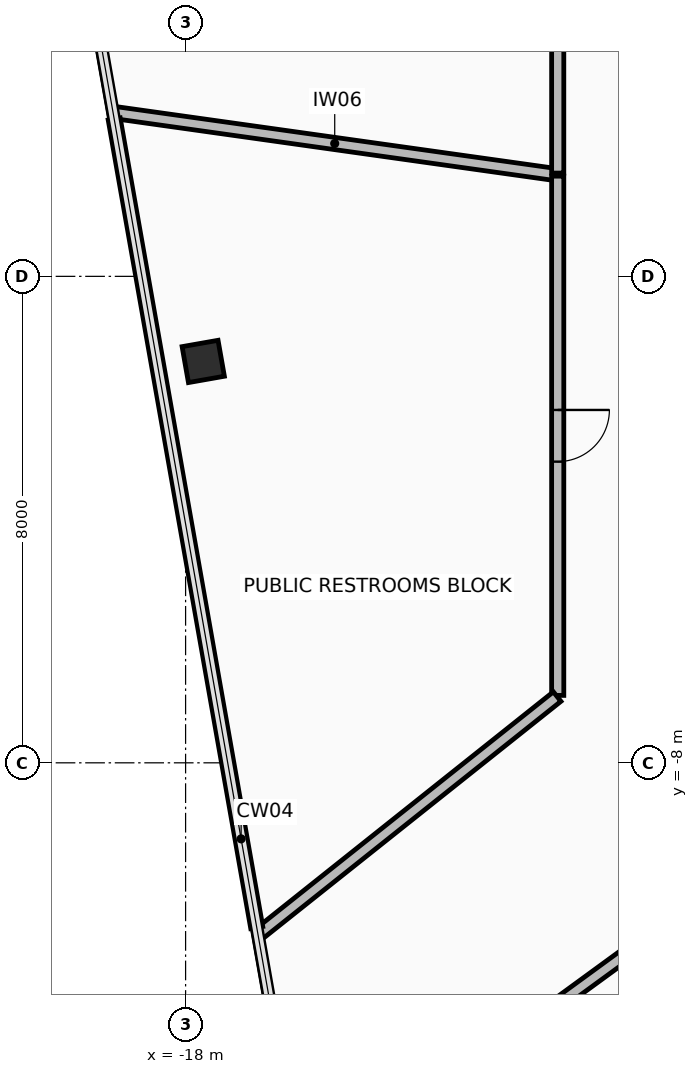
"""IFC4 building model, lengths in metres.
Left out: names, types, materials, properties, quantities, classifications, styles, units other than length and angle.
Written with IfcOpenShell. Run it as: python <this file> out.ifc"""

import sys

from ifc_helpers import new_model, si_unit, direction, frame, frame_2d, origin, origin_2d, place, context, subcontext, project, spatial, rectangle, hollow_rectangle, extrude, element, fill, save


model = new_model("IFC4")
c1 = context("Model", 3, precision=1e-05, world=origin(), true_north=direction((0.0, 1.0)))
c2 = subcontext(c1, "Body", "Model", "MODEL_VIEW")
j1 = project(units=[si_unit("LENGTHUNIT", "METRE"), si_unit("PLANEANGLEUNIT", "RADIAN")], contexts=[c1])
p1 = place(None, origin())
s1 = spatial("IfcSite", under=j1, at=p1, CompositionType="ELEMENT")
p2 = place(p1, origin())
s2 = spatial("IfcBuilding", under=s1, at=p2, CompositionType="ELEMENT")
p3 = place(p2, frame((0.0, 0.0, 181.3)))
s3 = spatial("IfcBuildingStorey", under=s2, at=p3, CompositionType="ELEMENT", Elevation=181.3)
p4 = place(p3, frame((-17.71, -1.399, 0.0), z_axis=(0.0, 0.0, 1.0), x_axis=(-0.173648177667, 0.984807753012, 0.0)))
e1 = element("IfcColumn", 1, at=p4, inside=s3, PredefinedType="COLUMN", context=c2, shape_type="SweptSolid", body=[
    extrude(hollow_rectangle(XDim=0.6, YDim=0.6, WallThickness=0.036, at=origin_2d()), origin(), (0.0, 0.0, 1.0), 3.6),
])
p5 = place(p3, frame((-19.194, 2.698, 0.0), z_axis=(0.0, 0.0, 1.0), x_axis=(0.990266577483, -0.139183711406, 0.0)))
e2 = element("IfcWall", 2, at=p5, inside=s3, PredefinedType="PARTITIONING", context=c2, shape_type="SweptSolid", body=[
    extrude(rectangle(XDim=7.364, YDim=0.2, at=frame_2d((3.682, 0.0))), origin(), (0.0, 0.0, 1.0), 2.715),
])
p6 = place(p3, frame((-11.88, 1.648, 0.0), z_axis=(0.0, 0.0, 1.0), x_axis=(0.0, -1.0, 0.0)))
e3 = element("IfcWall", 3, at=p6, inside=s3, PredefinedType="PARTITIONING", context=c2, shape_type="SweptSolid", body=[
    extrude(rectangle(XDim=8.539, YDim=0.2, at=frame_2d((4.27, 0.0))), origin(), (0.0, 0.0, 1.0), 2.865),
])
p7 = place(p6, frame((3.845, 0.0, 0.0)))
e4 = element("IfcOpeningElement", 4, at=p7, cuts=e3, PredefinedType="OPENING", context=c2, shape_type="SweptSolid", body=[
    extrude(rectangle(XDim=0.85, YDim=2.1, at=frame_2d((0.425, 1.05))), frame((0.0, 0.11, 0.0), z_axis=(0.0, -1.0, 0.0), x_axis=(1.0, 0.0, 0.0)), (0.0, 0.0, 1.0), 0.22),
])
p8 = place(p3, frame((-11.889, -6.911, 0.0), z_axis=(0.0, 0.0, 1.0), x_axis=(-0.782381746657, -0.622799167066, 0.0)))
e5 = element("IfcWall", 5, at=p8, inside=s3, PredefinedType="PARTITIONING", context=c2, shape_type="SweptSolid", body=[
    extrude(rectangle(XDim=6.288, YDim=0.2, at=frame_2d((3.144, 0.0))), origin(), (0.0, 0.0, 1.0), 2.715),
])
p9 = place(p3, frame((-16.83, -10.709, 0.0), z_axis=(0.0, 0.0, 1.0), x_axis=(-0.173641964803, 0.984808848487, 0.0)))
e6 = element("IfcWall", 6, at=p9, inside=s3, PredefinedType="PARTITIONING", context=c2, shape_type="SweptSolid", body=[
    extrude(rectangle(XDim=13.503, YDim=0.2, at=frame_2d((6.751, 0.0))), origin(), (0.0, 0.0, 1.0), 3.42),
])
p10 = place(p3, frame((-11.88, 10.579, 0.0), z_axis=(0.0, 0.0, 1.0), x_axis=(0.0, -1.0, 0.0)))
e7 = element("IfcWall", 7, at=p10, inside=s3, PredefinedType="PARTITIONING", context=c2, shape_type="SweptSolid", body=[
    extrude(rectangle(XDim=8.881, YDim=0.2, at=frame_2d((4.44, 0.0))), origin(), (0.0, 0.0, 1.0), 2.765),
])
p11 = place(p10, frame((3.941, 0.0, 0.0)))
e8 = element("IfcOpeningElement", 8, at=p11, cuts=e7, PredefinedType="OPENING", context=c2, shape_type="SweptSolid", body=[
    extrude(rectangle(XDim=1.0, YDim=2.15, at=frame_2d((0.5, 1.075))), frame((0.0, 0.11, 0.0), z_axis=(0.0, -1.0, 0.0), x_axis=(1.0, 0.0, 0.0)), (0.0, 0.0, 1.0), 0.22),
])
p12 = place(p3, frame((-16.069, -15.024, 0.0), z_axis=(0.0, 0.0, 1.0), x_axis=(0.807835167635, 0.589408467815, 0.0)))
e9 = element("IfcWall", 9, at=p12, inside=s3, PredefinedType="PARTITIONING", context=c2, shape_type="SweptSolid", body=[
    extrude(rectangle(XDim=7.531, YDim=0.2, at=frame_2d((3.766, 0.0))), origin(), (0.0, 0.0, 1.0), 2.715),
])
p13 = place(p7, origin())
e10 = element("IfcDoor", 10, at=p13, inside=s3, OperationType="SINGLE_SWING_RIGHT", PredefinedType="DOOR", context=c2, shape_type="SweptSolid", body=[
    extrude(rectangle(XDim=0.85, YDim=2.1, at=frame_2d((0.425, 1.05))), frame((0.0, 0.025, 0.0), z_axis=(0.0, -1.0, 0.0), x_axis=(1.0, 0.0, 0.0)), (0.0, 0.0, 1.0), 0.05),
])
fill(e4, e10)
save(model, sys.argv[1])
